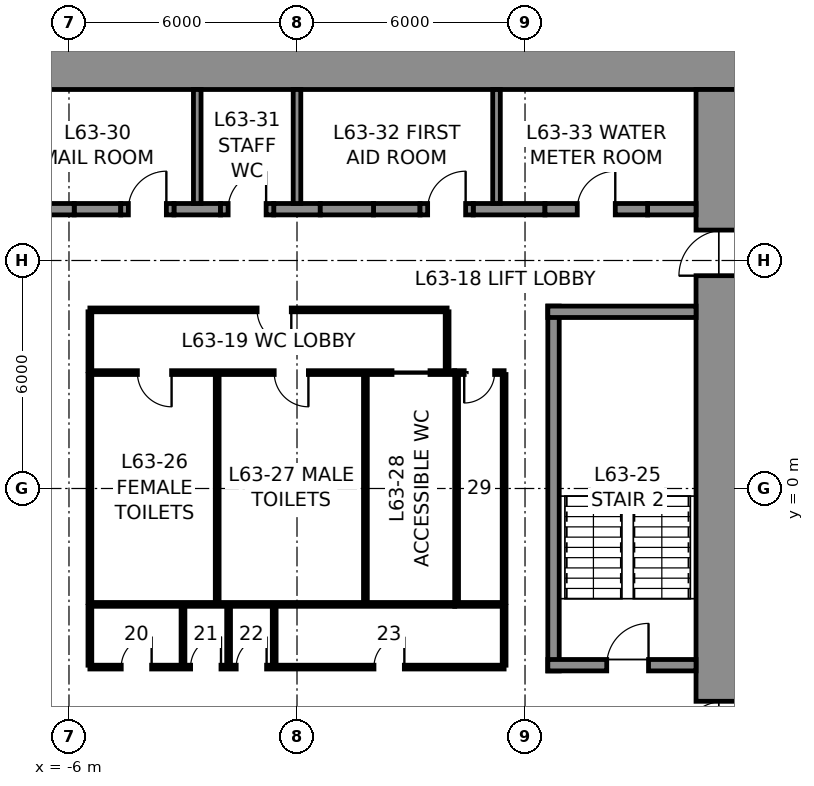
"""IFC4 building model, lengths in metres.
Left out: names, types, materials, properties, quantities, classifications, styles, units other than length and angle.
Written with IfcOpenShell. Run it as: python <this file> out.ifc"""

import sys

from ifc_helpers import new_model, si_unit, direction, frame, frame_2d, origin, place, context, subcontext, project, spatial, rectangle, extrude, element, fill, save


model = new_model("IFC4")
c1 = context("Model", 3, precision=1e-05, world=origin(), true_north=direction((0.0, 1.0)))
c2 = subcontext(c1, "Body", "Model", "MODEL_VIEW")
j1 = project(units=[si_unit("LENGTHUNIT", "METRE"), si_unit("PLANEANGLEUNIT", "RADIAN")], contexts=[c1])
p1 = place(None, origin())
s1 = spatial("IfcSite", under=j1, at=p1, CompositionType="ELEMENT")
p2 = place(p1, origin())
s2 = spatial("IfcBuilding", under=s1, at=p2, CompositionType="ELEMENT")
p3 = place(p2, frame((0.0, 0.0, 281.8)))
s3 = spatial("IfcBuildingStorey", under=s2, at=p3, CompositionType="ELEMENT", Elevation=281.8)
p4 = place(p3, frame((-12.0, 11.25, 0.0), z_axis=(0.0, 0.0, 1.0), x_axis=(1.0, 0.0, 0.0)))
e1 = element("IfcWall", 1, at=p4, inside=s3, PredefinedType="SHEAR", context=c2, shape_type="SweptSolid", body=[
    extrude(rectangle(XDim=24.0, YDim=1.5, at=frame_2d((12.0, 0.0))), origin(), (0.0, 0.0, 1.0), 4.0),
])
p5 = place(p3, frame((11.25, 10.5, 0.0), z_axis=(0.0, 0.0, 1.0), x_axis=(0.0, -1.0, 0.0)))
e2 = element("IfcWall", 2, at=p5, inside=s3, PredefinedType="SHEAR", context=c2, shape_type="SweptSolid", body=[
    extrude(rectangle(XDim=21.0, YDim=1.5, at=frame_2d((10.5, 0.0))), origin(), (0.0, 0.0, 1.0), 4.0),
])
p6 = place(p5, frame((3.7, 0.0, 0.0)))
e3 = element("IfcOpeningElement", 3, at=p6, cuts=e2, PredefinedType="OPENING", context=c2, shape_type="SweptSolid", body=[
    extrude(rectangle(XDim=1.2, YDim=2.3, at=frame_2d((0.6, 1.15))), frame((0.0, 0.76, 0.0), z_axis=(0.0, -1.0, 0.0), x_axis=(1.0, 0.0, 0.0)), (0.0, 0.0, 1.0), 1.52),
])
p7 = place(p5, frame((16.1, 0.0, 0.0)))
e4 = element("IfcOpeningElement", 4, at=p7, cuts=e2, PredefinedType="OPENING", context=c2, shape_type="SweptSolid", body=[
    extrude(rectangle(XDim=1.2, YDim=2.3, at=frame_2d((0.6, 1.15))), frame((0.0, 0.76, 0.0), z_axis=(0.0, -1.0, 0.0), x_axis=(1.0, 0.0, 0.0)), (0.0, 0.0, 1.0), 1.52),
])
for number, where, z_axis, x_axis in (
    (5, (-5.863, 7.35, 0.0), (0.0, 0.0, 1.0), (1.0, 0.0, 0.0)),
    (6, (-3.238, 7.35, 0.0), (0.0, 0.0, 1.0), (1.0, 0.0, 0.0)),
    (7, (-0.613, 7.35, 0.0), (0.0, 0.0, 1.0), (1.0, 0.0, 0.0)),
    (8, (2.012, 7.35, 0.0), (0.0, 0.0, 1.0), (1.0, 0.0, 0.0)),
):
    element("IfcWall", number, at=place(p3, frame(where, z_axis=z_axis, x_axis=x_axis)), inside=s3, PredefinedType="SHEAR", context=c2, shape_type="SweptSolid", body=[
        extrude(rectangle(XDim=1.225, YDim=0.3, at=frame_2d((0.613, 0.0))), origin(), (0.0, 0.0, 1.0), 4.0),
    ])
p8 = place(p3, frame((4.637, 7.35, 0.0), z_axis=(0.0, 0.0, 1.0), x_axis=(1.0, 0.0, 0.0)))
e9 = element("IfcWall", 9, at=p8, inside=s3, PredefinedType="SHEAR", context=c2, shape_type="SweptSolid", body=[
    extrude(rectangle(XDim=1.887, YDim=0.3, at=frame_2d((0.944, 0.0))), origin(), (0.0, 0.0, 1.0), 4.0),
])
p9 = place(p3, frame((9.225, 7.35, 0.0), z_axis=(0.0, 0.0, 1.0), x_axis=(1.0, 0.0, 0.0)))
e10 = element("IfcWall", 10, at=p9, inside=s3, PredefinedType="SHEAR", context=c2, shape_type="SweptSolid", body=[
    extrude(rectangle(XDim=1.275, YDim=0.3, at=frame_2d((0.637, 0.0))), origin(), (0.0, 0.0, 1.0), 4.0),
])
p10 = place(p3, frame((-7.262, 7.35, 0.0), z_axis=(0.0, 0.0, 1.0), x_axis=(1.0, 0.0, 0.0)))
e11 = element("IfcWall", 11, at=p10, inside=s3, PredefinedType="PARTITIONING", context=c2, shape_type="SweptSolid", body=[
    extrude(rectangle(XDim=1.4, YDim=0.3, at=frame_2d((0.7, 0.0))), origin(), (0.0, 0.0, 1.0), 4.0),
])
p11 = place(p3, frame((-4.637, 7.35, 0.0), z_axis=(0.0, 0.0, 1.0), x_axis=(1.0, 0.0, 0.0)))
e12 = element("IfcWall", 12, at=p11, inside=s3, PredefinedType="PARTITIONING", context=c2, shape_type="SweptSolid", body=[
    extrude(rectangle(XDim=1.4, YDim=0.3, at=frame_2d((0.7, 0.0))), origin(), (0.0, 0.0, 1.0), 4.0),
])
p12 = place(p11, frame((0.2, 0.0, 0.0)))
e13 = element("IfcOpeningElement", 13, at=p12, cuts=e12, PredefinedType="OPENING", context=c2, shape_type="SweptSolid", body=[
    extrude(rectangle(XDim=1.0, YDim=2.3, at=frame_2d((0.5, 1.15))), frame((0.0, 0.16, 0.0), z_axis=(0.0, -1.0, 0.0), x_axis=(1.0, 0.0, 0.0)), (0.0, 0.0, 1.0), 0.32),
])
p13 = place(p3, frame((-2.012, 7.35, 0.0), z_axis=(0.0, 0.0, 1.0), x_axis=(1.0, 0.0, 0.0)))
e14 = element("IfcWall", 14, at=p13, inside=s3, PredefinedType="PARTITIONING", context=c2, shape_type="SweptSolid", body=[
    extrude(rectangle(XDim=1.4, YDim=0.3, at=frame_2d((0.7, 0.0))), origin(), (0.0, 0.0, 1.0), 4.0),
])
p14 = place(p13, frame((0.2, 0.0, 0.0)))
e15 = element("IfcOpeningElement", 15, at=p14, cuts=e14, PredefinedType="OPENING", context=c2, shape_type="SweptSolid", body=[
    extrude(rectangle(XDim=1.0, YDim=2.3, at=frame_2d((0.5, 1.15))), frame((0.0, 0.16, 0.0), z_axis=(0.0, -1.0, 0.0), x_axis=(1.0, 0.0, 0.0)), (0.0, 0.0, 1.0), 0.32),
])
p15 = place(p3, frame((0.613, 7.35, 0.0), z_axis=(0.0, 0.0, 1.0), x_axis=(1.0, 0.0, 0.0)))
e16 = element("IfcWall", 16, at=p15, inside=s3, PredefinedType="PARTITIONING", context=c2, shape_type="SweptSolid", body=[
    extrude(rectangle(XDim=1.4, YDim=0.3, at=frame_2d((0.7, 0.0))), origin(), (0.0, 0.0, 1.0), 4.0),
])
p16 = place(p3, frame((3.238, 7.35, 0.0), z_axis=(0.0, 0.0, 1.0), x_axis=(1.0, 0.0, 0.0)))
e17 = element("IfcWall", 17, at=p16, inside=s3, PredefinedType="PARTITIONING", context=c2, shape_type="SweptSolid", body=[
    extrude(rectangle(XDim=1.4, YDim=0.3, at=frame_2d((0.7, 0.0))), origin(), (0.0, 0.0, 1.0), 4.0),
])
p17 = place(p16, frame((0.2, 0.0, 0.0)))
e18 = element("IfcOpeningElement", 18, at=p17, cuts=e17, PredefinedType="OPENING", context=c2, shape_type="SweptSolid", body=[
    extrude(rectangle(XDim=1.0, YDim=2.3, at=frame_2d((0.5, 1.15))), frame((0.0, 0.16, 0.0), z_axis=(0.0, -1.0, 0.0), x_axis=(1.0, 0.0, 0.0)), (0.0, 0.0, 1.0), 0.32),
])
p18 = place(p3, frame((6.525, 7.35, 0.0), z_axis=(0.0, 0.0, 1.0), x_axis=(1.0, 0.0, 0.0)))
e19 = element("IfcWall", 19, at=p18, inside=s3, PredefinedType="PARTITIONING", context=c2, shape_type="SweptSolid", body=[
    extrude(rectangle(XDim=2.7, YDim=0.3, at=frame_2d((1.35, 0.0))), origin(), (0.0, 0.0, 1.0), 4.0),
])
p19 = place(p18, frame((0.85, 0.0, 0.0)))
e20 = element("IfcOpeningElement", 20, at=p19, cuts=e19, PredefinedType="OPENING", context=c2, shape_type="SweptSolid", body=[
    extrude(rectangle(XDim=1.0, YDim=2.3, at=frame_2d((0.5, 1.15))), frame((0.0, 0.16, 0.0), z_axis=(0.0, -1.0, 0.0), x_axis=(1.0, 0.0, 0.0)), (0.0, 0.0, 1.0), 0.32),
])
for number, where, z_axis, x_axis in (
    (21, (-2.625, 7.5, 0.0), (0.0, 0.0, 1.0), (0.0, 1.0, 0.0)),
    (22, (0.0, 7.5, 0.0), (0.0, 0.0, 1.0), (0.0, 1.0, 0.0)),
    (23, (5.25, 7.5, 0.0), (0.0, 0.0, 1.0), (0.0, 1.0, 0.0)),
):
    element("IfcWall", number, at=place(p3, frame(where, z_axis=z_axis, x_axis=x_axis)), inside=s3, PredefinedType="PARTITIONING", context=c2, shape_type="SweptSolid", body=[
        extrude(rectangle(XDim=3.0, YDim=0.2, at=frame_2d((1.5, 0.0))), origin(), (0.0, 0.0, 1.0), 4.0),
    ])
p20 = place(p3, frame((6.75, -4.8, 0.0), z_axis=(0.0, 0.0, 1.0), x_axis=(0.0, 1.0, 0.0)))
e24 = element("IfcWall", 24, at=p20, inside=s3, PredefinedType="SOLIDWALL", context=c2, shape_type="SweptSolid", body=[
    extrude(rectangle(XDim=9.6, YDim=0.3, at=frame_2d((4.8, 0.0))), origin(), (0.0, 0.0, 1.0), 3.75),
])
p21 = place(p3, frame((6.6, 4.65, 0.0), z_axis=(0.0, 0.0, 1.0), x_axis=(1.0, 0.0, 0.0)))
e25 = element("IfcWall", 25, at=p21, inside=s3, PredefinedType="SOLIDWALL", context=c2, shape_type="SweptSolid", body=[
    extrude(rectangle(XDim=3.9, YDim=0.3, at=frame_2d((1.95, 0.0))), origin(), (0.0, 0.0, 1.0), 3.75),
])
p22 = place(p3, frame((10.5, -4.65, 0.0), z_axis=(0.0, 0.0, 1.0), x_axis=(-1.0, 0.0, 0.0)))
e26 = element("IfcWall", 26, at=p22, inside=s3, PredefinedType="SOLIDWALL", context=c2, shape_type="SweptSolid", body=[
    extrude(rectangle(XDim=3.9, YDim=0.3, at=frame_2d((1.95, 0.0))), origin(), (0.0, 0.0, 1.0), 3.75),
])
p23 = place(p22, frame((1.25, 0.0, 0.0)))
e27 = element("IfcOpeningElement", 27, at=p23, cuts=e26, PredefinedType="OPENING", context=c2, shape_type="SweptSolid", body=[
    extrude(rectangle(XDim=1.1, YDim=2.3, at=frame_2d((0.55, 1.15))), frame((0.0, 0.16, 0.0), z_axis=(0.0, -1.0, 0.0), x_axis=(1.0, 0.0, 0.0)), (0.0, 0.0, 1.0), 0.32),
])
p24 = place(p3, frame((-5.45, 3.05, 0.0), z_axis=(0.0, 0.0, 1.0), x_axis=(1.0, 0.0, 0.0)))
e28 = element("IfcWall", 28, at=p24, inside=s3, PredefinedType="PARTITIONING", context=c2, shape_type="SweptSolid", body=[
    extrude(rectangle(XDim=9.6, YDim=0.1, at=frame_2d((4.8, 0.0))), origin(), (0.0, 0.0, 1.0), 3.75),
])
p25 = place(p24, frame((1.25, 0.0, 0.0)))
e29 = element("IfcOpeningElement", 29, at=p25, cuts=e28, PredefinedType="OPENING", context=c2, shape_type="SweptSolid", body=[
    extrude(rectangle(XDim=0.9, YDim=2.3, at=frame_2d((0.45, 1.15))), frame((0.0, 0.06, 0.0), z_axis=(0.0, -1.0, 0.0), x_axis=(1.0, 0.0, 0.0)), (0.0, 0.0, 1.0), 0.12),
])
p26 = place(p24, frame((4.85, 0.0, 0.0)))
e30 = element("IfcOpeningElement", 30, at=p26, cuts=e28, PredefinedType="OPENING", context=c2, shape_type="SweptSolid", body=[
    extrude(rectangle(XDim=0.9, YDim=2.3, at=frame_2d((0.45, 1.15))), frame((0.0, 0.06, 0.0), z_axis=(0.0, -1.0, 0.0), x_axis=(1.0, 0.0, 0.0)), (0.0, 0.0, 1.0), 0.12),
])
p27 = place(p24, frame((7.95, 0.0, 0.0)))
e31 = element("IfcOpeningElement", 31, at=p27, cuts=e28, PredefinedType="OPENING", context=c2, shape_type="SweptSolid", body=[
    extrude(rectangle(XDim=1.0, YDim=2.3, at=frame_2d((0.5, 1.15))), frame((0.0, 0.06, 0.0), z_axis=(0.0, -1.0, 0.0), x_axis=(1.0, 0.0, 0.0)), (0.0, 0.0, 1.0), 0.12),
])
p28 = place(p3, frame((4.15, 3.05, 0.0), z_axis=(0.0, 0.0, 1.0), x_axis=(1.0, 0.0, 0.0)))
e32 = element("IfcWall", 32, at=p28, inside=s3, PredefinedType="PARTITIONING", context=c2, shape_type="SweptSolid", body=[
    extrude(rectangle(XDim=1.3, YDim=0.1, at=frame_2d((0.65, 0.0))), origin(), (0.0, 0.0, 1.0), 3.75),
])
p29 = place(p28, frame((0.25, 0.0, 0.0)))
e33 = element("IfcOpeningElement", 33, at=p29, cuts=e32, PredefinedType="OPENING", context=c2, shape_type="SweptSolid", body=[
    extrude(rectangle(XDim=0.8, YDim=2.3, at=frame_2d((0.4, 1.15))), frame((0.0, 0.06, 0.0), z_axis=(0.0, -1.0, 0.0), x_axis=(1.0, 0.0, 0.0)), (0.0, 0.0, 1.0), 0.12),
])
p30 = place(p3, frame((4.15, -3.05, 0.0), z_axis=(0.0, 0.0, 1.0), x_axis=(-1.0, 0.0, 0.0)))
e34 = element("IfcWall", 34, at=p30, inside=s3, PredefinedType="PARTITIONING", context=c2, shape_type="SweptSolid", body=[
    extrude(rectangle(XDim=9.6, YDim=0.1, at=frame_2d((4.8, 0.0))), origin(), (0.0, 0.0, 1.0), 3.75),
])
p31 = place(p3, frame((5.45, -3.05, 0.0), z_axis=(0.0, 0.0, 1.0), x_axis=(-1.0, 0.0, 0.0)))
e35 = element("IfcWall", 35, at=p31, inside=s3, PredefinedType="PARTITIONING", context=c2, shape_type="SweptSolid", body=[
    extrude(rectangle(XDim=1.3, YDim=0.1, at=frame_2d((0.65, 0.0))), origin(), (0.0, 0.0, 1.0), 3.75),
])
for number, where, z_axis, x_axis in (
    (36, (5.45, 3.0, 0.0), (0.0, 0.0, 1.0), (0.0, -1.0, 0.0)),
    (37, (-5.45, -3.0, 0.0), (0.0, 0.0, 1.0), (0.0, 1.0, 0.0)),
    (38, (-2.1, -3.0, 0.0), (0.0, 0.0, 1.0), (0.0, 1.0, 0.0)),
    (39, (1.8, -3.0, 0.0), (0.0, 0.0, 1.0), (0.0, 1.0, 0.0)),
    (40, (4.2, -3.0, 0.0), (0.0, 0.0, 1.0), (0.0, 1.0, 0.0)),
):
    element("IfcWall", number, at=place(p3, frame(where, z_axis=z_axis, x_axis=x_axis)), inside=s3, PredefinedType="PARTITIONING", context=c2, shape_type="SweptSolid", body=[
        extrude(rectangle(XDim=6.0, YDim=0.1, at=frame_2d((3.0, 0.0))), origin(), (0.0, 0.0, 1.0), 3.75),
    ])
p32 = place(p3, frame((-5.45, 4.7, 0.0), z_axis=(0.0, 0.0, 1.0), x_axis=(1.0, 0.0, 0.0)))
e41 = element("IfcWall", 41, at=p32, inside=s3, PredefinedType="PARTITIONING", context=c2, shape_type="SweptSolid", body=[
    extrude(rectangle(XDim=9.4, YDim=0.1, at=frame_2d((4.7, 0.0))), origin(), (0.0, 0.0, 1.0), 3.75),
])
p33 = place(p32, frame((4.4, 0.0, 0.0)))
e42 = element("IfcOpeningElement", 42, at=p33, cuts=e41, PredefinedType="OPENING", context=c2, shape_type="SweptSolid", body=[
    extrude(rectangle(XDim=0.9, YDim=2.3, at=frame_2d((0.45, 1.15))), frame((0.0, 0.06, 0.0), z_axis=(0.0, -1.0, 0.0), x_axis=(1.0, 0.0, 0.0)), (0.0, 0.0, 1.0), 0.12),
])
for number, where, z_axis, x_axis in (
    (43, (-5.45, 3.1, 0.0), (0.0, 0.0, 1.0), (0.0, 1.0, 0.0)),
    (44, (3.95, 3.1, 0.0), (0.0, 0.0, 1.0), (0.0, 1.0, 0.0)),
):
    element("IfcWall", number, at=place(p3, frame(where, z_axis=z_axis, x_axis=x_axis)), inside=s3, PredefinedType="PARTITIONING", context=c2, shape_type="SweptSolid", body=[
        extrude(rectangle(XDim=1.55, YDim=0.1, at=frame_2d((0.775, 0.0))), origin(), (0.0, 0.0, 1.0), 3.75),
    ])
p34 = place(p3, frame((5.45, -4.7, 0.0), z_axis=(0.0, 0.0, 1.0), x_axis=(-1.0, 0.0, 0.0)))
e45 = element("IfcWall", 45, at=p34, inside=s3, PredefinedType="PARTITIONING", context=c2, shape_type="SweptSolid", body=[
    extrude(rectangle(XDim=10.9, YDim=0.1, at=frame_2d((5.45, 0.0))), origin(), (0.0, 0.0, 1.0), 3.75),
])
p35 = place(p34, frame((9.275, 0.0, 0.0)))
e46 = element("IfcOpeningElement", 46, at=p35, cuts=e45, PredefinedType="OPENING", context=c2, shape_type="SweptSolid", body=[
    extrude(rectangle(XDim=0.8, YDim=2.3, at=frame_2d((0.4, 1.15))), frame((0.0, 0.06, 0.0), z_axis=(0.0, -1.0, 0.0), x_axis=(1.0, 0.0, 0.0)), (0.0, 0.0, 1.0), 0.12),
])
p36 = place(p34, frame((7.45, 0.0, 0.0)))
e47 = element("IfcOpeningElement", 47, at=p36, cuts=e45, PredefinedType="OPENING", context=c2, shape_type="SweptSolid", body=[
    extrude(rectangle(XDim=0.8, YDim=2.3, at=frame_2d((0.4, 1.15))), frame((0.0, 0.06, 0.0), z_axis=(0.0, -1.0, 0.0), x_axis=(1.0, 0.0, 0.0)), (0.0, 0.0, 1.0), 0.12),
])
p37 = place(p34, frame((6.25, 0.0, 0.0)))
e48 = element("IfcOpeningElement", 48, at=p37, cuts=e45, PredefinedType="OPENING", context=c2, shape_type="SweptSolid", body=[
    extrude(rectangle(XDim=0.8, YDim=2.3, at=frame_2d((0.4, 1.15))), frame((0.0, 0.06, 0.0), z_axis=(0.0, -1.0, 0.0), x_axis=(1.0, 0.0, 0.0)), (0.0, 0.0, 1.0), 0.12),
])
p38 = place(p34, frame((2.625, 0.0, 0.0)))
e49 = element("IfcOpeningElement", 49, at=p38, cuts=e45, PredefinedType="OPENING", context=c2, shape_type="SweptSolid", body=[
    extrude(rectangle(XDim=0.8, YDim=2.3, at=frame_2d((0.4, 1.15))), frame((0.0, 0.06, 0.0), z_axis=(0.0, -1.0, 0.0), x_axis=(1.0, 0.0, 0.0)), (0.0, 0.0, 1.0), 0.12),
])
for number, where, z_axis, x_axis in (
    (50, (-5.45, -3.1, 0.0), (0.0, 0.0, 1.0), (0.0, -1.0, 0.0)),
    (51, (5.45, -3.1, 0.0), (0.0, 0.0, 1.0), (0.0, -1.0, 0.0)),
    (52, (-3.0, -3.1, 0.0), (0.0, 0.0, 1.0), (0.0, -1.0, 0.0)),
    (53, (-1.8, -3.1, 0.0), (0.0, 0.0, 1.0), (0.0, -1.0, 0.0)),
    (54, (-0.6, -3.1, 0.0), (0.0, 0.0, 1.0), (0.0, -1.0, 0.0)),
):
    element("IfcWall", number, at=place(p3, frame(where, z_axis=z_axis, x_axis=x_axis)), inside=s3, PredefinedType="PARTITIONING", context=c2, shape_type="SweptSolid", body=[
        extrude(rectangle(XDim=1.55, YDim=0.1, at=frame_2d((0.775, 0.0))), origin(), (0.0, 0.0, 1.0), 3.75),
    ])
p39 = place(p23, frame((1.1, 0.0, 0.0), z_axis=(0.0, 0.0, 1.0), x_axis=(-1.0, 0.0, 0.0)))
e55 = element("IfcDoor", 55, at=p39, inside=s3, OperationType="SINGLE_SWING_RIGHT", PredefinedType="DOOR", context=c2, shape_type="SweptSolid", body=[
    extrude(rectangle(XDim=1.1, YDim=2.3, at=frame_2d((0.55, 1.15))), frame((0.0, 0.025, 0.0), z_axis=(0.0, -1.0, 0.0), x_axis=(1.0, 0.0, 0.0)), (0.0, 0.0, 1.0), 0.05),
])
fill(e27, e55)
p40 = place(p25, frame((0.9, 0.0, 0.0), z_axis=(0.0, 0.0, 1.0), x_axis=(-1.0, 0.0, 0.0)))
e56 = element("IfcDoor", 56, at=p40, inside=s3, OperationType="SINGLE_SWING_LEFT", PredefinedType="DOOR", context=c2, shape_type="SweptSolid", body=[
    extrude(rectangle(XDim=0.9, YDim=2.3, at=frame_2d((0.45, 1.15))), frame((0.0, 0.025, 0.0), z_axis=(0.0, -1.0, 0.0), x_axis=(1.0, 0.0, 0.0)), (0.0, 0.0, 1.0), 0.05),
])
fill(e29, e56)
p41 = place(p26, frame((0.9, 0.0, 0.0), z_axis=(0.0, 0.0, 1.0), x_axis=(-1.0, 0.0, 0.0)))
e57 = element("IfcDoor", 57, at=p41, inside=s3, OperationType="SINGLE_SWING_LEFT", PredefinedType="DOOR", context=c2, shape_type="SweptSolid", body=[
    extrude(rectangle(XDim=0.9, YDim=2.3, at=frame_2d((0.45, 1.15))), frame((0.0, 0.025, 0.0), z_axis=(0.0, -1.0, 0.0), x_axis=(1.0, 0.0, 0.0)), (0.0, 0.0, 1.0), 0.05),
])
fill(e30, e57)
p42 = place(p27, frame((1.0, 0.0, 0.0), z_axis=(0.0, 0.0, 1.0), x_axis=(-1.0, 0.0, 0.0)))
e58 = element("IfcDoor", 58, at=p42, inside=s3, OperationType="SLIDING_TO_LEFT", PredefinedType="DOOR", context=c2, shape_type="SweptSolid", body=[
    extrude(rectangle(XDim=1.0, YDim=2.3, at=frame_2d((0.5, 1.15))), frame((0.0, 0.025, 0.0), z_axis=(0.0, -1.0, 0.0), x_axis=(1.0, 0.0, 0.0)), (0.0, 0.0, 1.0), 0.05),
])
fill(e31, e58)
p43 = place(p29, frame((0.8, 0.0, 0.0), z_axis=(0.0, 0.0, 1.0), x_axis=(-1.0, 0.0, 0.0)))
e59 = element("IfcDoor", 59, at=p43, inside=s3, OperationType="SINGLE_SWING_RIGHT", PredefinedType="DOOR", context=c2, shape_type="SweptSolid", body=[
    extrude(rectangle(XDim=0.8, YDim=2.3, at=frame_2d((0.4, 1.15))), frame((0.0, 0.025, 0.0), z_axis=(0.0, -1.0, 0.0), x_axis=(1.0, 0.0, 0.0)), (0.0, 0.0, 1.0), 0.05),
])
fill(e33, e59)
p44 = place(p33, frame((0.9, 0.0, 0.0), z_axis=(0.0, 0.0, 1.0), x_axis=(-1.0, 0.0, 0.0)))
e60 = element("IfcDoor", 60, at=p44, inside=s3, OperationType="SINGLE_SWING_LEFT", PredefinedType="DOOR", context=c2, shape_type="SweptSolid", body=[
    extrude(rectangle(XDim=0.9, YDim=2.3, at=frame_2d((0.45, 1.15))), frame((0.0, 0.025, 0.0), z_axis=(0.0, -1.0, 0.0), x_axis=(1.0, 0.0, 0.0)), (0.0, 0.0, 1.0), 0.05),
])
fill(e42, e60)
p45 = place(p35, frame((0.8, 0.0, 0.0), z_axis=(0.0, 0.0, 1.0), x_axis=(-1.0, 0.0, 0.0)))
e61 = element("IfcDoor", 61, at=p45, inside=s3, OperationType="SINGLE_SWING_RIGHT", PredefinedType="DOOR", context=c2, shape_type="SweptSolid", body=[
    extrude(rectangle(XDim=0.8, YDim=2.3, at=frame_2d((0.4, 1.15))), frame((0.0, 0.025, 0.0), z_axis=(0.0, -1.0, 0.0), x_axis=(1.0, 0.0, 0.0)), (0.0, 0.0, 1.0), 0.05),
])
fill(e46, e61)
p46 = place(p36, frame((0.8, 0.0, 0.0), z_axis=(0.0, 0.0, 1.0), x_axis=(-1.0, 0.0, 0.0)))
e62 = element("IfcDoor", 62, at=p46, inside=s3, OperationType="SINGLE_SWING_RIGHT", PredefinedType="DOOR", context=c2, shape_type="SweptSolid", body=[
    extrude(rectangle(XDim=0.8, YDim=2.3, at=frame_2d((0.4, 1.15))), frame((0.0, 0.025, 0.0), z_axis=(0.0, -1.0, 0.0), x_axis=(1.0, 0.0, 0.0)), (0.0, 0.0, 1.0), 0.05),
])
fill(e47, e62)
p47 = place(p37, frame((0.8, 0.0, 0.0), z_axis=(0.0, 0.0, 1.0), x_axis=(-1.0, 0.0, 0.0)))
e63 = element("IfcDoor", 63, at=p47, inside=s3, OperationType="SINGLE_SWING_RIGHT", PredefinedType="DOOR", context=c2, shape_type="SweptSolid", body=[
    extrude(rectangle(XDim=0.8, YDim=2.3, at=frame_2d((0.4, 1.15))), frame((0.0, 0.025, 0.0), z_axis=(0.0, -1.0, 0.0), x_axis=(1.0, 0.0, 0.0)), (0.0, 0.0, 1.0), 0.05),
])
fill(e48, e63)
p48 = place(p38, frame((0.8, 0.0, 0.0), z_axis=(0.0, 0.0, 1.0), x_axis=(-1.0, 0.0, 0.0)))
e64 = element("IfcDoor", 64, at=p48, inside=s3, OperationType="SINGLE_SWING_RIGHT", PredefinedType="DOOR", context=c2, shape_type="SweptSolid", body=[
    extrude(rectangle(XDim=0.8, YDim=2.3, at=frame_2d((0.4, 1.15))), frame((0.0, 0.025, 0.0), z_axis=(0.0, -1.0, 0.0), x_axis=(1.0, 0.0, 0.0)), (0.0, 0.0, 1.0), 0.05),
])
fill(e49, e64)
p49 = place(p12, origin())
e65 = element("IfcDoor", 65, at=p49, inside=s3, OperationType="SINGLE_SWING_RIGHT", PredefinedType="DOOR", context=c2, shape_type="SweptSolid", body=[
    extrude(rectangle(XDim=1.0, YDim=2.3, at=frame_2d((0.5, 1.15))), frame((0.0, 0.025, 0.0), z_axis=(0.0, -1.0, 0.0), x_axis=(1.0, 0.0, 0.0)), (0.0, 0.0, 1.0), 0.05),
])
fill(e13, e65)
p50 = place(p14, origin())
e66 = element("IfcDoor", 66, at=p50, inside=s3, OperationType="SINGLE_SWING_RIGHT", PredefinedType="DOOR", context=c2, shape_type="SweptSolid", body=[
    extrude(rectangle(XDim=1.0, YDim=2.3, at=frame_2d((0.5, 1.15))), frame((0.0, 0.025, 0.0), z_axis=(0.0, -1.0, 0.0), x_axis=(1.0, 0.0, 0.0)), (0.0, 0.0, 1.0), 0.05),
])
fill(e15, e66)
p51 = place(p17, origin())
e67 = element("IfcDoor", 67, at=p51, inside=s3, OperationType="SINGLE_SWING_RIGHT", PredefinedType="DOOR", context=c2, shape_type="SweptSolid", body=[
    extrude(rectangle(XDim=1.0, YDim=2.3, at=frame_2d((0.5, 1.15))), frame((0.0, 0.025, 0.0), z_axis=(0.0, -1.0, 0.0), x_axis=(1.0, 0.0, 0.0)), (0.0, 0.0, 1.0), 0.05),
])
fill(e18, e67)
p52 = place(p19, origin())
e68 = element("IfcDoor", 68, at=p52, inside=s3, OperationType="SINGLE_SWING_RIGHT", PredefinedType="DOOR", context=c2, shape_type="SweptSolid", body=[
    extrude(rectangle(XDim=1.0, YDim=2.3, at=frame_2d((0.5, 1.15))), frame((0.0, 0.025, 0.0), z_axis=(0.0, -1.0, 0.0), x_axis=(1.0, 0.0, 0.0)), (0.0, 0.0, 1.0), 0.05),
])
fill(e20, e68)
p53 = place(p6, frame((1.2, 0.0, 0.0), z_axis=(0.0, 0.0, 1.0), x_axis=(-1.0, 0.0, 0.0)))
e69 = element("IfcDoor", 69, at=p53, inside=s3, OperationType="SINGLE_SWING_LEFT", PredefinedType="DOOR", context=c2, shape_type="SweptSolid", body=[
    extrude(rectangle(XDim=1.2, YDim=2.3, at=frame_2d((0.6, 1.15))), frame((0.0, 0.025, 0.0), z_axis=(0.0, -1.0, 0.0), x_axis=(1.0, 0.0, 0.0)), (0.0, 0.0, 1.0), 0.05),
])
fill(e3, e69)
p54 = place(p7, frame((1.2, 0.0, 0.0), z_axis=(0.0, 0.0, 1.0), x_axis=(-1.0, 0.0, 0.0)))
e70 = element("IfcDoor", 70, at=p54, inside=s3, OperationType="SINGLE_SWING_LEFT", PredefinedType="DOOR", context=c2, shape_type="SweptSolid", body=[
    extrude(rectangle(XDim=1.2, YDim=2.3, at=frame_2d((0.6, 1.15))), frame((0.0, 0.025, 0.0), z_axis=(0.0, -1.0, 0.0), x_axis=(1.0, 0.0, 0.0)), (0.0, 0.0, 1.0), 0.05),
])
fill(e4, e70)
save(model, sys.argv[1])
